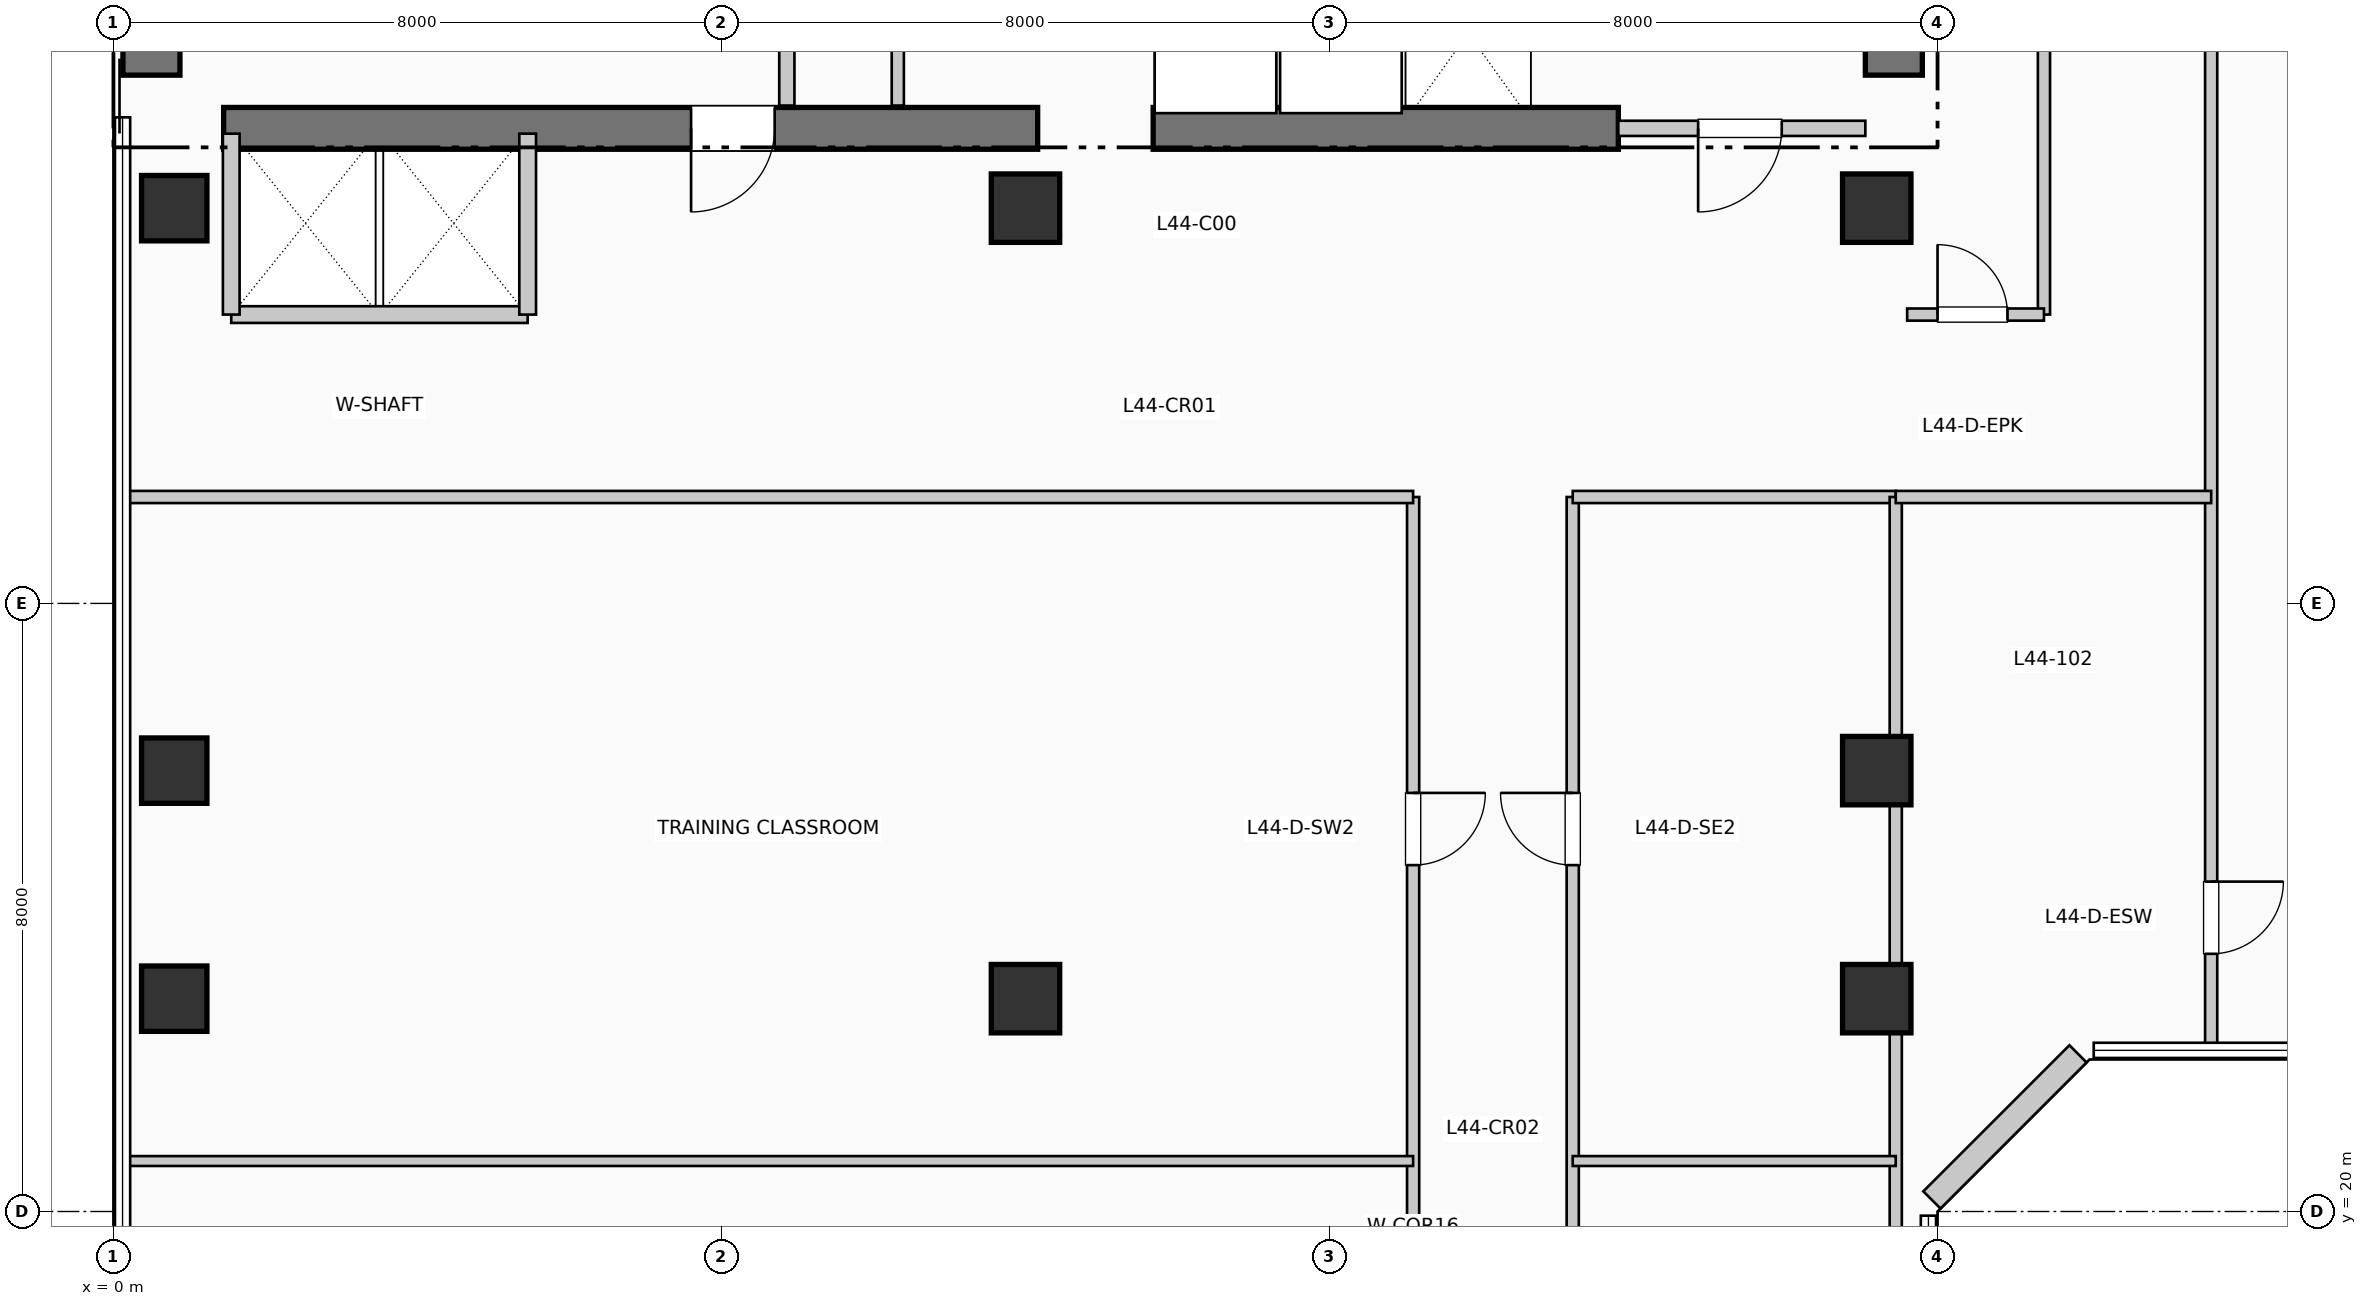
"""IFC4 building model, lengths in metres.
Left out: names, types, materials, properties, quantities, classifications, styles, units other than length and angle.
Written with IfcOpenShell. Run it as: python <this file> out.ifc"""

import sys

from ifc_helpers import new_model, si_unit, direction, frame, frame_2d, origin, origin_2d, place, context, subcontext, project, spatial, rectangle, extrude, element, fill, save


model = new_model("IFC4")
c1 = context("Model", 3, precision=1e-05, world=origin(), true_north=direction((0.0, 1.0)))
c2 = subcontext(c1, "Body", "Model", "MODEL_VIEW")
j1 = project(units=[si_unit("LENGTHUNIT", "METRE"), si_unit("PLANEANGLEUNIT", "RADIAN")], contexts=[c1])
p1 = place(None, origin())
s1 = spatial("IfcSite", under=j1, at=p1, CompositionType="ELEMENT")
p2 = place(p1, origin())
s2 = spatial("IfcBuilding", under=s1, at=p2, CompositionType="ELEMENT")
p3 = place(p2, frame((0.0, 0.0, 183.48)))
s3 = spatial("IfcBuildingStorey", under=s2, at=p3, CompositionType="ELEMENT", Elevation=183.48)
p4 = place(p3, frame((0.5, 34.95, 0.0), z_axis=(0.0, 0.0, 1.0), x_axis=(0.0, 1.0, 0.0)))
e1 = element("IfcWall", 1, at=p4, inside=s3, PredefinedType="SHEAR", context=c2, shape_type="SweptSolid", body=[
    extrude(rectangle(XDim=7.9, YDim=0.75, at=frame_2d((3.95, 0.0))), origin(), (0.0, 0.0, 1.0), 3.96),
])
p5 = place(p3, frame((23.425, 34.95, 0.0), z_axis=(0.0, 0.0, 1.0), x_axis=(0.0, 1.0, 0.0)))
e2 = element("IfcWall", 2, at=p5, inside=s3, PredefinedType="SHEAR", context=c2, shape_type="SweptSolid", body=[
    extrude(rectangle(XDim=10.64, YDim=0.75, at=frame_2d((5.32, 0.0))), origin(), (0.0, 0.0, 1.0), 3.96),
])
p6 = place(p3, frame((1.45, 34.25, 0.0), z_axis=(0.0, 0.0, 1.0), x_axis=(1.0, 0.0, 0.0)))
e3 = element("IfcWall", 3, at=p6, inside=s3, PredefinedType="SHEAR", context=c2, shape_type="SweptSolid", body=[
    extrude(rectangle(XDim=10.71, YDim=0.55, at=frame_2d((5.355, 0.0))), origin(), (0.0, 0.0, 1.0), 3.96),
])
p7 = place(p6, frame((7.25, 0.0, 0.0), z_axis=(0.0, 0.0, 1.0), x_axis=(-1.0, 0.0, 0.0)))
e4 = element("IfcOpeningElement", 4, at=p7, cuts=e3, PredefinedType="OPENING", context=c2, shape_type="SweptSolid", body=[
    extrude(rectangle(XDim=1.1, YDim=2.15, at=frame_2d((0.55, 1.075))), frame((0.0, 0.285, 0.0), z_axis=(0.0, -1.0, 0.0), x_axis=(1.0, 0.0, 0.0)), (0.0, 0.0, 1.0), 0.57),
])
p8 = place(p3, frame((13.68, 34.25, 0.0), z_axis=(0.0, 0.0, 1.0), x_axis=(1.0, 0.0, 0.0)))
e5 = element("IfcWall", 5, at=p8, inside=s3, PredefinedType="SHEAR", context=c2, shape_type="SweptSolid", body=[
    extrude(rectangle(XDim=6.12, YDim=0.55, at=frame_2d((3.06, 0.0))), origin(), (0.0, 0.0, 1.0), 3.96),
])
for number, where, z_axis, x_axis in (
    (6, (0.8, 22.8, 0.0), (0.0, 0.0, 1.0), (1.0, 0.0, 0.0)),
    (7, (0.8, 25.8, 0.0), (0.0, 0.0, 1.0), (1.0, 0.0, 0.0)),
    (8, (0.8, 33.2, 0.0), (0.0, 0.0, 1.0), (1.0, 0.0, 0.0)),
):
    element("IfcColumn", number, at=place(p3, frame(where, z_axis=z_axis, x_axis=x_axis)), inside=s3, PredefinedType="COLUMN", context=c2, shape_type="SweptSolid", body=[
        extrude(rectangle(XDim=0.86, YDim=0.86, at=origin_2d()), origin(), (0.0, 0.0, 1.0), 3.96),
    ])
for number, where, z_axis, x_axis in (
    (9, (12.0, 22.8, 0.0), (0.0, 0.0, 1.0), (1.0, 0.0, 0.0)),
    (10, (12.0, 33.2, 0.0), (0.0, 0.0, 1.0), (1.0, 0.0, 0.0)),
    (11, (23.2, 22.8, 0.0), (0.0, 0.0, 1.0), (1.0, 0.0, 0.0)),
    (12, (23.2, 25.8, 0.0), (0.0, 0.0, 1.0), (1.0, 0.0, 0.0)),
    (13, (23.2, 33.2, 0.0), (0.0, 0.0, 1.0), (1.0, 0.0, 0.0)),
):
    element("IfcColumn", number, at=place(p3, frame(where, z_axis=z_axis, x_axis=x_axis)), inside=s3, PredefinedType="COLUMN", context=c2, shape_type="SweptSolid", body=[
        extrude(rectangle(XDim=0.9, YDim=0.9, at=origin_2d()), origin(), (0.0, 0.0, 1.0), 3.96),
    ])
p9 = place(p3, frame((23.926, 20.152, 0.0), z_axis=(0.0, 0.0, 1.0), x_axis=(0.707106781187, 0.707106781187, 0.0)))
e14 = element("IfcWall", 14, at=p9, inside=s3, PredefinedType="SOLIDWALL", context=c2, shape_type="SweptSolid", body=[
    extrude(rectangle(XDim=2.718, YDim=0.32, at=frame_2d((1.359, 0.0))), origin(), (0.0, 0.0, 1.0), 3.71),
])
p10 = place(p3, frame((8.86, 34.55, 0.0), z_axis=(0.0, 0.0, 1.0), x_axis=(0.0, 1.0, 0.0)))
e15 = element("IfcWall", 15, at=p10, inside=s3, PredefinedType="PARTITIONING", context=c2, shape_type="SweptSolid", body=[
    extrude(rectangle(XDim=2.5, YDim=0.2, at=frame_2d((1.25, 0.0))), origin(), (0.0, 0.0, 1.0), 3.71),
])
p11 = place(p3, frame((19.8, 34.25, 0.0), z_axis=(0.0, 0.0, 1.0), x_axis=(1.0, 0.0, 0.0)))
e16 = element("IfcWall", 16, at=p11, inside=s3, PredefinedType="PARTITIONING", context=c2, shape_type="SweptSolid", body=[
    extrude(rectangle(XDim=3.25, YDim=0.2, at=frame_2d((1.625, 0.0))), origin(), (0.0, 0.0, 1.0), 3.71),
])
p12 = place(p11, frame((2.15, 0.0, 0.0), z_axis=(0.0, 0.0, 1.0), x_axis=(-1.0, 0.0, 0.0)))
e17 = element("IfcOpeningElement", 17, at=p12, cuts=e16, PredefinedType="OPENING", context=c2, shape_type="SweptSolid", body=[
    extrude(rectangle(XDim=1.1, YDim=2.15, at=frame_2d((0.55, 1.075))), frame((0.0, 0.11, 0.0), z_axis=(0.0, -1.0, 0.0), x_axis=(1.0, 0.0, 0.0)), (0.0, 0.0, 1.0), 0.22),
])
p13 = place(p3, frame((1.55, 31.8, 0.0), z_axis=(0.0, 0.0, 1.0), x_axis=(1.0, 0.0, 0.0)))
e18 = element("IfcWall", 18, at=p13, inside=s3, PredefinedType="PARTITIONING", context=c2, shape_type="SweptSolid", body=[
    extrude(rectangle(XDim=3.9, YDim=0.22, at=frame_2d((1.95, 0.0))), origin(), (0.0, 0.0, 1.0), 3.71),
])
for number, where, z_axis, x_axis in (
    (19, (1.55, 31.8, 0.0), (0.0, 0.0, 1.0), (0.0, 1.0, 0.0)),
    (20, (5.45, 31.8, 0.0), (0.0, 0.0, 1.0), (0.0, 1.0, 0.0)),
):
    element("IfcWall", number, at=place(p3, frame(where, z_axis=z_axis, x_axis=x_axis)), inside=s3, PredefinedType="PARTITIONING", context=c2, shape_type="SweptSolid", body=[
        extrude(rectangle(XDim=2.38, YDim=0.22, at=frame_2d((1.19, 0.0))), origin(), (0.0, 0.0, 1.0), 3.71),
    ])
p14 = place(p3, frame((10.32, 34.55, 0.0), z_axis=(0.0, 0.0, 1.0), x_axis=(0.0, 1.0, 0.0)))
e21 = element("IfcWall", 21, at=p14, inside=s3, PredefinedType="PARTITIONING", context=c2, shape_type="SweptSolid", body=[
    extrude(rectangle(XDim=2.15, YDim=0.16, at=frame_2d((1.075, 0.0))), origin(), (0.0, 0.0, 1.0), 3.71),
])
p15 = place(p3, frame((17.1, 12.6, 0.0), z_axis=(0.0, 0.0, 1.0), x_axis=(0.0, 1.0, 0.0)))
e22 = element("IfcWall", 22, at=p15, inside=s3, PredefinedType="PARTITIONING", context=c2, shape_type="SweptSolid", body=[
    extrude(rectangle(XDim=16.8, YDim=0.16, at=frame_2d((8.4, 0.0))), origin(), (0.0, 0.0, 1.0), 3.71),
])
p16 = place(p15, frame((4.507, 0.0, 0.0), z_axis=(0.0, 0.0, 1.0), x_axis=(-1.0, 0.0, 0.0)))
e23 = element("IfcOpeningElement", 23, at=p16, cuts=e22, PredefinedType="OPENING", context=c2, shape_type="SweptSolid", body=[
    extrude(rectangle(XDim=0.95, YDim=2.15, at=frame_2d((0.475, 1.075))), frame((0.0, 0.09, 0.0), z_axis=(0.0, -1.0, 0.0), x_axis=(1.0, 0.0, 0.0)), (0.0, 0.0, 1.0), 0.18),
])
p17 = place(p15, frame((12.907, 0.0, 0.0), z_axis=(0.0, 0.0, 1.0), x_axis=(-1.0, 0.0, 0.0)))
e24 = element("IfcOpeningElement", 24, at=p17, cuts=e22, PredefinedType="OPENING", context=c2, shape_type="SweptSolid", body=[
    extrude(rectangle(XDim=0.95, YDim=2.15, at=frame_2d((0.475, 1.075))), frame((0.0, 0.09, 0.0), z_axis=(0.0, -1.0, 0.0), x_axis=(1.0, 0.0, 0.0)), (0.0, 0.0, 1.0), 0.18),
])
p18 = place(p3, frame((19.2, 12.6, 0.0), z_axis=(0.0, 0.0, 1.0), x_axis=(0.0, 1.0, 0.0)))
e25 = element("IfcWall", 25, at=p18, inside=s3, PredefinedType="PARTITIONING", context=c2, shape_type="SweptSolid", body=[
    extrude(rectangle(XDim=16.8, YDim=0.16, at=frame_2d((8.4, 0.0))), origin(), (0.0, 0.0, 1.0), 3.71),
])
p19 = place(p18, frame((3.557, 0.0, 0.0)))
e26 = element("IfcOpeningElement", 26, at=p19, cuts=e25, PredefinedType="OPENING", context=c2, shape_type="SweptSolid", body=[
    extrude(rectangle(XDim=0.95, YDim=2.15, at=frame_2d((0.475, 1.075))), frame((0.0, 0.09, 0.0), z_axis=(0.0, -1.0, 0.0), x_axis=(1.0, 0.0, 0.0)), (0.0, 0.0, 1.0), 0.18),
])
p20 = place(p18, frame((11.957, 0.0, 0.0)))
e27 = element("IfcOpeningElement", 27, at=p20, cuts=e25, PredefinedType="OPENING", context=c2, shape_type="SweptSolid", body=[
    extrude(rectangle(XDim=0.95, YDim=2.15, at=frame_2d((0.475, 1.075))), frame((0.0, 0.09, 0.0), z_axis=(0.0, -1.0, 0.0), x_axis=(1.0, 0.0, 0.0)), (0.0, 0.0, 1.0), 0.18),
])
p21 = place(p3, frame((0.19, 29.4, 0.0), z_axis=(0.0, 0.0, 1.0), x_axis=(1.0, 0.0, 0.0)))
e28 = element("IfcWall", 28, at=p21, inside=s3, PredefinedType="PARTITIONING", context=c2, shape_type="SweptSolid", body=[
    extrude(rectangle(XDim=16.91, YDim=0.16, at=frame_2d((8.455, 0.0))), origin(), (0.0, 0.0, 1.0), 3.365),
])
p22 = place(p3, frame((19.2, 29.4, 0.0), z_axis=(0.0, 0.0, 1.0), x_axis=(1.0, 0.0, 0.0)))
e29 = element("IfcWall", 29, at=p22, inside=s3, PredefinedType="PARTITIONING", context=c2, shape_type="SweptSolid", body=[
    extrude(rectangle(XDim=4.25, YDim=0.16, at=frame_2d((2.125, 0.0))), origin(), (0.0, 0.0, 1.0), 3.71),
])
p23 = place(p3, frame((23.45, 1.04, 0.0), z_axis=(0.0, 0.0, 1.0), x_axis=(0.0, 1.0, 0.0)))
e30 = element("IfcWall", 30, at=p23, inside=s3, PredefinedType="PARTITIONING", context=c2, shape_type="SweptSolid", body=[
    extrude(rectangle(XDim=28.36, YDim=0.16, at=frame_2d((14.18, 0.0))), origin(), (0.0, 0.0, 1.0), 3.045),
])
p24 = place(p3, frame((0.19, 20.664, 0.0), z_axis=(0.0, 0.0, 1.0), x_axis=(1.0, 0.0, 0.0)))
e31 = element("IfcWall", 31, at=p24, inside=s3, PredefinedType="PARTITIONING", context=c2, shape_type="SweptSolid", body=[
    extrude(rectangle(XDim=16.91, YDim=0.13, at=frame_2d((8.455, 0.0))), origin(), (0.0, 0.0, 1.0), 3.71),
])
p25 = place(p3, frame((19.2, 20.664, 0.0), z_axis=(0.0, 0.0, 1.0), x_axis=(1.0, 0.0, 0.0)))
e32 = element("IfcWall", 32, at=p25, inside=s3, PredefinedType="PARTITIONING", context=c2, shape_type="SweptSolid", body=[
    extrude(rectangle(XDim=4.25, YDim=0.13, at=frame_2d((2.125, 0.0))), origin(), (0.0, 0.0, 1.0), 3.71),
])
p26 = place(p3, frame((25.4, 31.8, 0.0), z_axis=(0.0, 0.0, 1.0), x_axis=(0.0, 1.0, 0.0)))
e33 = element("IfcWall", 33, at=p26, inside=s3, PredefinedType="PARTITIONING", context=c2, shape_type="SweptSolid", body=[
    extrude(rectangle(XDim=14.01, YDim=0.16, at=frame_2d((7.005, 0.0))), origin(), (0.0, 0.0, 1.0), 3.71),
])
p27 = place(p3, frame((27.6, 22.19, 0.0), z_axis=(0.0, 0.0, 1.0), x_axis=(0.0, 1.0, 0.0)))
e34 = element("IfcWall", 34, at=p27, inside=s3, PredefinedType="PARTITIONING", context=c2, shape_type="SweptSolid", body=[
    extrude(rectangle(XDim=15.01, YDim=0.16, at=frame_2d((7.505, 0.0))), origin(), (0.0, 0.0, 1.0), 3.71),
])
p28 = place(p27, frame((2.15, 0.0, 0.0), z_axis=(0.0, 0.0, 1.0), x_axis=(-1.0, 0.0, 0.0)))
e35 = element("IfcOpeningElement", 35, at=p28, cuts=e34, PredefinedType="OPENING", context=c2, shape_type="SweptSolid", body=[
    extrude(rectangle(XDim=0.95, YDim=2.15, at=frame_2d((0.475, 1.075))), frame((0.0, 0.09, 0.0), z_axis=(0.0, -1.0, 0.0), x_axis=(1.0, 0.0, 0.0)), (0.0, 0.0, 1.0), 0.18),
])
p29 = place(p3, frame((23.45, 29.4, 0.0), z_axis=(0.0, 0.0, 1.0), x_axis=(1.0, 0.0, 0.0)))
e36 = element("IfcWall", 36, at=p29, inside=s3, PredefinedType="PARTITIONING", context=c2, shape_type="SweptSolid", body=[
    extrude(rectangle(XDim=4.15, YDim=0.16, at=frame_2d((2.075, 0.0))), origin(), (0.0, 0.0, 1.0), 3.365),
])
p30 = place(p3, frame((23.6, 31.8, 0.0), z_axis=(0.0, 0.0, 1.0), x_axis=(1.0, 0.0, 0.0)))
e37 = element("IfcWall", 37, at=p30, inside=s3, PredefinedType="PARTITIONING", context=c2, shape_type="SweptSolid", body=[
    extrude(rectangle(XDim=1.8, YDim=0.16, at=frame_2d((0.9, 0.0))), origin(), (0.0, 0.0, 1.0), 3.71),
])
p31 = place(p30, frame((0.4, 0.0, 0.0)))
e38 = element("IfcOpeningElement", 38, at=p31, cuts=e37, PredefinedType="OPENING", context=c2, shape_type="SweptSolid", body=[
    extrude(rectangle(XDim=0.92, YDim=2.1, at=frame_2d((0.46, 1.05))), frame((0.0, 0.09, 0.0), z_axis=(0.0, -1.0, 0.0), x_axis=(1.0, 0.0, 0.0)), (0.0, 0.0, 1.0), 0.18),
])
p32 = place(p7, origin())
e39 = element("IfcDoor", 39, at=p32, inside=s3, OperationType="SINGLE_SWING_LEFT", PredefinedType="DOOR", context=c2, shape_type="SweptSolid", body=[
    extrude(rectangle(XDim=1.1, YDim=2.15, at=frame_2d((0.55, 1.075))), frame((0.0, 0.025, 0.0), z_axis=(0.0, -1.0, 0.0), x_axis=(1.0, 0.0, 0.0)), (0.0, 0.0, 1.0), 0.05),
])
fill(e4, e39)
p33 = place(p12, origin())
e40 = element("IfcDoor", 40, at=p33, inside=s3, OperationType="SINGLE_SWING_LEFT", PredefinedType="DOOR", context=c2, shape_type="SweptSolid", body=[
    extrude(rectangle(XDim=1.1, YDim=2.15, at=frame_2d((0.55, 1.075))), frame((0.0, 0.025, 0.0), z_axis=(0.0, -1.0, 0.0), x_axis=(1.0, 0.0, 0.0)), (0.0, 0.0, 1.0), 0.05),
])
fill(e17, e40)
p34 = place(p17, origin())
e41 = element("IfcDoor", 41, at=p34, inside=s3, OperationType="SINGLE_SWING_RIGHT", PredefinedType="DOOR", context=c2, shape_type="SweptSolid", body=[
    extrude(rectangle(XDim=0.95, YDim=2.15, at=frame_2d((0.475, 1.075))), frame((0.0, 0.025, 0.0), z_axis=(0.0, -1.0, 0.0), x_axis=(1.0, 0.0, 0.0)), (0.0, 0.0, 1.0), 0.05),
])
fill(e24, e41)
p35 = place(p20, origin())
e42 = element("IfcDoor", 42, at=p35, inside=s3, OperationType="SINGLE_SWING_RIGHT", PredefinedType="DOOR", context=c2, shape_type="SweptSolid", body=[
    extrude(rectangle(XDim=0.95, YDim=2.15, at=frame_2d((0.475, 1.075))), frame((0.0, 0.025, 0.0), z_axis=(0.0, -1.0, 0.0), x_axis=(1.0, 0.0, 0.0)), (0.0, 0.0, 1.0), 0.05),
])
fill(e27, e42)
p36 = place(p31, origin())
e43 = element("IfcDoor", 43, at=p36, inside=s3, OperationType="SINGLE_SWING_LEFT", PredefinedType="DOOR", context=c2, shape_type="SweptSolid", body=[
    extrude(rectangle(XDim=0.92, YDim=2.1, at=frame_2d((0.46, 1.05))), frame((0.0, 0.025, 0.0), z_axis=(0.0, -1.0, 0.0), x_axis=(1.0, 0.0, 0.0)), (0.0, 0.0, 1.0), 0.05),
])
fill(e38, e43)
p37 = place(p28, origin())
e44 = element("IfcDoor", 44, at=p37, inside=s3, OperationType="SINGLE_SWING_RIGHT", PredefinedType="DOOR", context=c2, shape_type="SweptSolid", body=[
    extrude(rectangle(XDim=0.95, YDim=2.15, at=frame_2d((0.475, 1.075))), frame((0.0, 0.025, 0.0), z_axis=(0.0, -1.0, 0.0), x_axis=(1.0, 0.0, 0.0)), (0.0, 0.0, 1.0), 0.05),
])
fill(e35, e44)
save(model, sys.argv[1])
